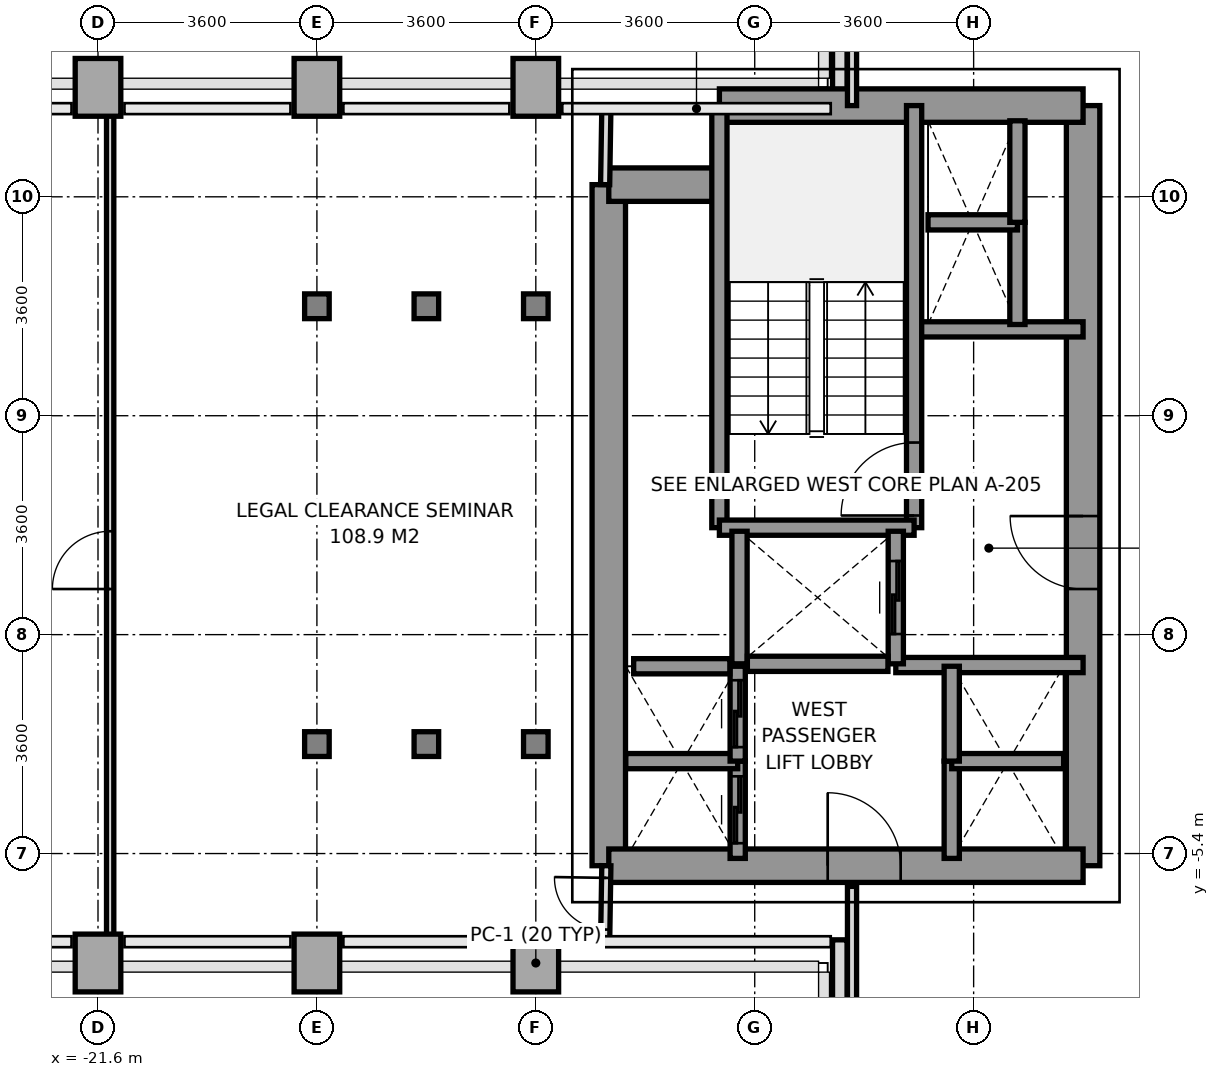
"""IFC4 building model, lengths in metres.
Left out: names, types, materials, properties, quantities, classifications, styles, units other than length and angle.
Written with IfcOpenShell. Run it as: python <this file> out.ifc"""

import sys

from ifc_helpers import new_model, si_unit, direction, frame, frame_2d, origin, origin_2d, place, context, subcontext, project, spatial, rectangle, i_section, extrude, source, transform, mapped, element, fill, save


model = new_model("IFC4")
c1 = context("Model", 3, precision=1e-05, world=origin(), true_north=direction((0.0, 1.0)))
c2 = subcontext(c1, "Body", "Model", "MODEL_VIEW")
j1 = project(units=[si_unit("LENGTHUNIT", "METRE"), si_unit("PLANEANGLEUNIT", "RADIAN")], contexts=[c1])
p1 = place(None, origin())
s1 = spatial("IfcSite", under=j1, at=p1, CompositionType="ELEMENT")
p2 = place(p1, origin())
s2 = spatial("IfcBuilding", under=s1, at=p2, CompositionType="ELEMENT")
p3 = place(p2, frame((0.0, 0.0, 68.0)))
s3 = spatial("IfcBuildingStorey", under=s2, at=p3, CompositionType="ELEMENT", Elevation=68.0)
m1 = source(origin(), c2, "Body", "SweptSolid", [
    extrude(rectangle(XDim=0.75, YDim=0.95, at=origin_2d()), origin(), (0.0, 0.0, 1.0), 3.2),
])
for number, where, z_axis, x_axis in (
    (1, (-21.6, -7.2, 0.0), (0.0, 0.0, 1.0), (1.0, 0.0, 0.0)),
    (2, (-21.6, 7.2, 0.0), (0.0, 0.0, 1.0), (1.0, 0.0, 0.0)),
    (3, (-18.0, -7.2, 0.0), (0.0, 0.0, 1.0), (1.0, 0.0, 0.0)),
):
    element("IfcColumn", number, at=place(p3, frame(where, z_axis=z_axis, x_axis=x_axis)), inside=s3, PredefinedType="COLUMN", context=c2, shape_type="MappedRepresentation", body=[
        mapped(m1, transform((0.0, 0.0, 0.0), x_axis=(1.0, 0.0, 0.0), y_axis=(0.0, 1.0, 0.0), z_axis=(0.0, 0.0, 1.0), scale=1.0)),
    ])
m2 = source(origin(), c2, "Body", "SweptSolid", [
    extrude(i_section(OverallWidth=0.404, OverallDepth=0.407, WebThickness=0.022, FlangeThickness=0.035, at=origin_2d()), origin(), (0.0, 0.0, 1.0), 3.2),
])
for number, where, z_axis, x_axis in (
    (4, (-18.0, -3.6, 0.0), (0.0, 0.0, 1.0), (1.0, 0.0, 0.0)),
    (5, (-18.0, 3.6, 0.0), (0.0, 0.0, 1.0), (1.0, 0.0, 0.0)),
):
    element("IfcColumn", number, at=place(p3, frame(where, z_axis=z_axis, x_axis=x_axis)), inside=s3, PredefinedType="COLUMN", context=c2, shape_type="MappedRepresentation", body=[
        mapped(m2, transform((0.0, 0.0, 0.0), x_axis=(1.0, 0.0, 0.0), y_axis=(0.0, 1.0, 0.0), z_axis=(0.0, 0.0, 1.0), scale=1.0)),
    ])
p4 = place(p3, frame((-18.0, 7.2, 0.0), z_axis=(0.0, 0.0, 1.0), x_axis=(1.0, 0.0, 0.0)))
e6 = element("IfcColumn", 6, at=p4, inside=s3, PredefinedType="COLUMN", context=c2, shape_type="MappedRepresentation", body=[
    mapped(m1, transform((0.0, 0.0, 0.0), x_axis=(1.0, 0.0, 0.0), y_axis=(0.0, 1.0, 0.0), z_axis=(0.0, 0.0, 1.0), scale=1.0)),
])
for number, where, z_axis, x_axis in (
    (7, (-16.2, -3.6, 0.0), (0.0, 0.0, 1.0), (1.0, 0.0, 0.0)),
    (8, (-16.2, 3.6, 0.0), (0.0, 0.0, 1.0), (1.0, 0.0, 0.0)),
):
    element("IfcColumn", number, at=place(p3, frame(where, z_axis=z_axis, x_axis=x_axis)), inside=s3, PredefinedType="COLUMN", context=c2, shape_type="MappedRepresentation", body=[
        mapped(m2, transform((0.0, 0.0, 0.0), x_axis=(1.0, 0.0, 0.0), y_axis=(0.0, 1.0, 0.0), z_axis=(0.0, 0.0, 1.0), scale=1.0)),
    ])
p5 = place(p3, frame((-14.4, -7.2, 0.0), z_axis=(0.0, 0.0, 1.0), x_axis=(1.0, 0.0, 0.0)))
e9 = element("IfcColumn", 9, at=p5, inside=s3, PredefinedType="COLUMN", context=c2, shape_type="MappedRepresentation", body=[
    mapped(m1, transform((0.0, 0.0, 0.0), x_axis=(1.0, 0.0, 0.0), y_axis=(0.0, 1.0, 0.0), z_axis=(0.0, 0.0, 1.0), scale=1.0)),
])
for number, where, z_axis, x_axis in (
    (10, (-14.4, -3.6, 0.0), (0.0, 0.0, 1.0), (1.0, 0.0, 0.0)),
    (11, (-14.4, 3.6, 0.0), (0.0, 0.0, 1.0), (1.0, 0.0, 0.0)),
):
    element("IfcColumn", number, at=place(p3, frame(where, z_axis=z_axis, x_axis=x_axis)), inside=s3, PredefinedType="COLUMN", context=c2, shape_type="MappedRepresentation", body=[
        mapped(m2, transform((0.0, 0.0, 0.0), x_axis=(1.0, 0.0, 0.0), y_axis=(0.0, 1.0, 0.0), z_axis=(0.0, 0.0, 1.0), scale=1.0)),
    ])
p6 = place(p3, frame((-14.4, 7.2, 0.0), z_axis=(0.0, 0.0, 1.0), x_axis=(1.0, 0.0, 0.0)))
e12 = element("IfcColumn", 12, at=p6, inside=s3, PredefinedType="COLUMN", context=c2, shape_type="MappedRepresentation", body=[
    mapped(m1, transform((0.0, 0.0, 0.0), x_axis=(1.0, 0.0, 0.0), y_axis=(0.0, 1.0, 0.0), z_axis=(0.0, 0.0, 1.0), scale=1.0)),
])
p7 = place(p3, frame((-9.4, -8.397, 0.0), z_axis=(0.0, 0.0, 1.0), x_axis=(0.0, 1.0, 0.0)))
e13 = element("IfcWall", 13, at=p7, inside=s3, PredefinedType="PARAPET", context=c2, shape_type="SweptSolid", body=[
    extrude(rectangle(XDim=1.578, YDim=0.24, at=frame_2d((0.789, 0.0))), origin(), (0.0, 0.0, 1.0), 1.15),
])
p8 = place(p3, frame((-9.4, 6.953, 0.0), z_axis=(0.0, 0.0, 1.0), x_axis=(0.0, 1.0, 0.0)))
e14 = element("IfcWall", 14, at=p8, inside=s3, PredefinedType="PARAPET", context=c2, shape_type="SweptSolid", body=[
    extrude(rectangle(XDim=1.444, YDim=0.24, at=frame_2d((0.722, 0.0))), origin(), (0.0, 0.0, 1.0), 1.15),
])
p9 = place(p3, frame((-13.2, -5.6, 0.0), z_axis=(0.0, 0.0, 1.0), x_axis=(0.0, 1.0, 0.0)))
e15 = element("IfcWall", 15, at=p9, inside=s3, PredefinedType="SHEAR", context=c2, shape_type="SweptSolid", body=[
    extrude(rectangle(XDim=11.2, YDim=0.55, at=frame_2d((5.6, 0.0))), origin(), (0.0, 0.0, 1.0), 3.2),
])
p10 = place(p3, frame((-5.4, -5.6, 0.0), z_axis=(0.0, 0.0, 1.0), x_axis=(0.0, 1.0, 0.0)))
e16 = element("IfcWall", 16, at=p10, inside=s3, PredefinedType="SHEAR", context=c2, shape_type="SweptSolid", body=[
    extrude(rectangle(XDim=12.5, YDim=0.55, at=frame_2d((6.25, 0.0))), origin(), (0.0, 0.0, 1.0), 3.2),
])
p11 = place(p10, frame((4.55, 0.0, 0.0)))
e17 = element("IfcOpeningElement", 17, at=p11, cuts=e16, PredefinedType="OPENING", context=c2, shape_type="SweptSolid", body=[
    extrude(rectangle(XDim=1.2, YDim=2.2, at=frame_2d((0.6, 1.1))), frame((0.0, 0.285, 0.0), z_axis=(0.0, -1.0, 0.0), x_axis=(1.0, 0.0, 0.0)), (0.0, 0.0, 1.0), 0.57),
])
p12 = place(p3, frame((-11.381, 6.9, 0.0), z_axis=(0.0, 0.0, 1.0), x_axis=(1.0, 0.0, 0.0)))
e18 = element("IfcWall", 18, at=p12, inside=s3, PredefinedType="SHEAR", context=c2, shape_type="SweptSolid", body=[
    extrude(rectangle(XDim=5.981, YDim=0.55, at=frame_2d((2.991, 0.0))), origin(), (0.0, 0.0, 1.0), 3.2),
])
p13 = place(p3, frame((-13.2, 5.6, 0.0), z_axis=(0.0, 0.0, 1.0), x_axis=(1.0, 0.0, 0.0)))
e19 = element("IfcWall", 19, at=p13, inside=s3, PredefinedType="SHEAR", context=c2, shape_type="SweptSolid", body=[
    extrude(rectangle(XDim=1.819, YDim=0.55, at=frame_2d((0.909, 0.0))), origin(), (0.0, 0.0, 1.0), 3.2),
])
p14 = place(p3, frame((-13.2, -5.6, 0.0), z_axis=(0.0, 0.0, 1.0), x_axis=(1.0, 0.0, 0.0)))
e20 = element("IfcWall", 20, at=p14, inside=s3, PredefinedType="SHEAR", context=c2, shape_type="SweptSolid", body=[
    extrude(rectangle(XDim=7.8, YDim=0.55, at=frame_2d((3.9, 0.0))), origin(), (0.0, 0.0, 1.0), 3.2),
])
p15 = place(p14, frame((3.6, 0.0, 0.0)))
e21 = element("IfcOpeningElement", 21, at=p15, cuts=e20, PredefinedType="OPENING", context=c2, shape_type="SweptSolid", body=[
    extrude(rectangle(XDim=1.2, YDim=2.2, at=frame_2d((0.6, 1.1))), frame((0.0, 0.285, 0.0), z_axis=(0.0, -1.0, 0.0), x_axis=(1.0, 0.0, 0.0)), (0.0, 0.0, 1.0), 0.57),
])
p16 = place(p3, frame((-8.18, 3.22, 0.0), z_axis=(0.0, 0.0, 1.0), x_axis=(1.0, 0.0, 0.0)))
e22 = element("IfcWall", 22, at=p16, inside=s3, PredefinedType="SOLIDWALL", context=c2, shape_type="SweptSolid", body=[
    extrude(rectangle(XDim=2.78, YDim=0.25, at=frame_2d((1.39, 0.0))), origin(), (0.0, 0.0, 1.0), 3.2),
])
p17 = place(p3, frame((-8.48, -2.3, 0.0), z_axis=(0.0, 0.0, 1.0), x_axis=(1.0, 0.0, 0.0)))
e23 = element("IfcWall", 23, at=p17, inside=s3, PredefinedType="SOLIDWALL", context=c2, shape_type="SweptSolid", body=[
    extrude(rectangle(XDim=3.08, YDim=0.25, at=frame_2d((1.54, 0.0))), origin(), (0.0, 0.0, 1.0), 3.2),
])
p18 = place(p3, frame((-8.179, -0.041, 0.0), z_axis=(0.0, 0.0, 1.0), x_axis=(0.0, 1.0, 0.0)))
e24 = element("IfcWall", 24, at=p18, inside=s3, PredefinedType="SOLIDWALL", context=c2, shape_type="SweptSolid", body=[
    extrude(rectangle(XDim=6.941, YDim=0.25, at=frame_2d((3.47, 0.0))), origin(), (0.0, 0.0, 1.0), 3.2),
])
p19 = place(p18, frame((0.2, 0.0, 0.0)))
e25 = element("IfcOpeningElement", 25, at=p19, cuts=e24, PredefinedType="OPENING", context=c2, shape_type="SweptSolid", body=[
    extrude(rectangle(XDim=1.2, YDim=2.2, at=frame_2d((0.6, 1.1))), frame((0.0, 0.135, 0.0), z_axis=(0.0, -1.0, 0.0), x_axis=(1.0, 0.0, 0.0)), (0.0, 0.0, 1.0), 0.27),
])
p20 = place(p3, frame((-11.381, -0.041, 0.0), z_axis=(0.0, 0.0, 1.0), x_axis=(0.0, 1.0, 0.0)))
e26 = element("IfcWall", 26, at=p20, inside=s3, PredefinedType="SOLIDWALL", context=c2, shape_type="SweptSolid", body=[
    extrude(rectangle(XDim=6.941, YDim=0.25, at=frame_2d((3.47, 0.0))), origin(), (0.0, 0.0, 1.0), 3.2),
])
p21 = place(p3, frame((-11.381, -0.041, 0.0), z_axis=(0.0, 0.0, 1.0), x_axis=(1.0, 0.0, 0.0)))
e27 = element("IfcWall", 27, at=p21, inside=s3, PredefinedType="SOLIDWALL", context=c2, shape_type="SweptSolid", body=[
    extrude(rectangle(XDim=3.202, YDim=0.25, at=frame_2d((1.601, 0.0))), origin(), (0.0, 0.0, 1.0), 3.2),
])
p22 = place(p3, frame((-11.05, -2.28, 0.0), z_axis=(0.0, 0.0, 1.0), x_axis=(0.0, 1.0, 0.0)))
e28 = element("IfcWall", 28, at=p22, inside=s3, PredefinedType="SOLIDWALL", context=c2, shape_type="SweptSolid", body=[
    extrude(rectangle(XDim=2.18, YDim=0.25, at=frame_2d((1.09, 0.0))), origin(), (0.0, 0.0, 1.0), 3.2),
])
p23 = place(p3, frame((-8.48, -2.28, 0.0), z_axis=(0.0, 0.0, 1.0), x_axis=(0.0, 1.0, 0.0)))
e29 = element("IfcWall", 29, at=p23, inside=s3, PredefinedType="SOLIDWALL", context=c2, shape_type="SweptSolid", body=[
    extrude(rectangle(XDim=2.18, YDim=0.25, at=frame_2d((1.09, 0.0))), origin(), (0.0, 0.0, 1.0), 3.2),
])
p24 = place(p23, frame((0.49, 0.0, 0.0)))
e30 = element("IfcOpeningElement", 30, at=p24, cuts=e29, PredefinedType="OPENING", context=c2, shape_type="SweptSolid", body=[
    extrude(rectangle(XDim=1.2, YDim=2.2, at=frame_2d((0.6, 1.1))), frame((0.0, 0.135, 0.0), z_axis=(0.0, -1.0, 0.0), x_axis=(1.0, 0.0, 0.0)), (0.0, 0.0, 1.0), 0.27),
])
p25 = place(p3, frame((-10.921, -2.28, 0.0), z_axis=(0.0, 0.0, 1.0), x_axis=(1.0, 0.0, 0.0)))
e31 = element("IfcWall", 31, at=p25, inside=s3, PredefinedType="SOLIDWALL", context=c2, shape_type="SweptSolid", body=[
    extrude(rectangle(XDim=2.312, YDim=0.25, at=frame_2d((1.156, 0.0))), origin(), (0.0, 0.0, 1.0), 3.2),
])
p26 = place(p3, frame((-11.08, -5.48, 0.0), z_axis=(0.0, 0.0, 1.0), x_axis=(0.0, 1.0, 0.0)))
e32 = element("IfcWall", 32, at=p26, inside=s3, PredefinedType="SOLIDWALL", context=c2, shape_type="SweptSolid", body=[
    extrude(rectangle(XDim=1.6, YDim=0.25, at=frame_2d((0.8, 0.0))), origin(), (0.0, 0.0, 1.0), 3.2),
])
p27 = place(p26, frame((0.25, 0.0, 0.0)))
e33 = element("IfcOpeningElement", 33, at=p27, cuts=e32, PredefinedType="OPENING", context=c2, shape_type="SweptSolid", body=[
    extrude(rectangle(XDim=1.1, YDim=2.2, at=frame_2d((0.55, 1.1))), frame((0.0, 0.135, 0.0), z_axis=(0.0, -1.0, 0.0), x_axis=(1.0, 0.0, 0.0)), (0.0, 0.0, 1.0), 0.27),
])
p28 = place(p3, frame((-12.92, -3.88, 0.0), z_axis=(0.0, 0.0, 1.0), x_axis=(1.0, 0.0, 0.0)))
e34 = element("IfcWall", 34, at=p28, inside=s3, PredefinedType="SOLIDWALL", context=c2, shape_type="SweptSolid", body=[
    extrude(rectangle(XDim=1.84, YDim=0.25, at=frame_2d((0.92, 0.0))), origin(), (0.0, 0.0, 1.0), 3.2),
])
p29 = place(p3, frame((-11.08, -3.88, 0.0), z_axis=(0.0, 0.0, 1.0), x_axis=(0.0, 1.0, 0.0)))
e35 = element("IfcWall", 35, at=p29, inside=s3, PredefinedType="SOLIDWALL", context=c2, shape_type="SweptSolid", body=[
    extrude(rectangle(XDim=1.56, YDim=0.25, at=frame_2d((0.78, 0.0))), origin(), (0.0, 0.0, 1.0), 3.2),
])
p30 = place(p29, frame((0.23, 0.0, 0.0)))
e36 = element("IfcOpeningElement", 36, at=p30, cuts=e35, PredefinedType="OPENING", context=c2, shape_type="SweptSolid", body=[
    extrude(rectangle(XDim=1.1, YDim=2.2, at=frame_2d((0.55, 1.1))), frame((0.0, 0.135, 0.0), z_axis=(0.0, -1.0, 0.0), x_axis=(1.0, 0.0, 0.0)), (0.0, 0.0, 1.0), 0.27),
])
p31 = place(p3, frame((-12.791, -2.32, 0.0), z_axis=(0.0, 0.0, 1.0), x_axis=(1.0, 0.0, 0.0)))
e37 = element("IfcWall", 37, at=p31, inside=s3, PredefinedType="SOLIDWALL", context=c2, shape_type="SweptSolid", body=[
    extrude(rectangle(XDim=1.582, YDim=0.25, at=frame_2d((0.791, 0.0))), origin(), (0.0, 0.0, 1.0), 3.2),
])
p32 = place(p3, frame((-7.56, -5.48, 0.0), z_axis=(0.0, 0.0, 1.0), x_axis=(0.0, 1.0, 0.0)))
e38 = element("IfcWall", 38, at=p32, inside=s3, PredefinedType="SOLIDWALL", context=c2, shape_type="SweptSolid", body=[
    extrude(rectangle(XDim=1.6, YDim=0.25, at=frame_2d((0.8, 0.0))), origin(), (0.0, 0.0, 1.0), 3.2),
])
p33 = place(p3, frame((-7.56, -3.88, 0.0), z_axis=(0.0, 0.0, 1.0), x_axis=(1.0, 0.0, 0.0)))
e39 = element("IfcWall", 39, at=p33, inside=s3, PredefinedType="SOLIDWALL", context=c2, shape_type="SweptSolid", body=[
    extrude(rectangle(XDim=1.84, YDim=0.25, at=frame_2d((0.92, 0.0))), origin(), (0.0, 0.0, 1.0), 3.2),
])
p34 = place(p3, frame((-7.56, -3.88, 0.0), z_axis=(0.0, 0.0, 1.0), x_axis=(0.0, 1.0, 0.0)))
e40 = element("IfcWall", 40, at=p34, inside=s3, PredefinedType="SOLIDWALL", context=c2, shape_type="SweptSolid", body=[
    extrude(rectangle(XDim=1.56, YDim=0.25, at=frame_2d((0.78, 0.0))), origin(), (0.0, 0.0, 1.0), 3.2),
])
p35 = place(p3, frame((-6.48, 3.3, 0.0), z_axis=(0.0, 0.0, 1.0), x_axis=(0.0, 1.0, 0.0)))
e41 = element("IfcWall", 41, at=p35, inside=s3, PredefinedType="SOLIDWALL", context=c2, shape_type="SweptSolid", body=[
    extrude(rectangle(XDim=1.68, YDim=0.25, at=frame_2d((0.84, 0.0))), origin(), (0.0, 0.0, 1.0), 3.2),
])
p36 = place(p3, frame((-7.95, 4.98, 0.0), z_axis=(0.0, 0.0, 1.0), x_axis=(1.0, 0.0, 0.0)))
e42 = element("IfcWall", 42, at=p36, inside=s3, PredefinedType="SOLIDWALL", context=c2, shape_type="SweptSolid", body=[
    extrude(rectangle(XDim=1.47, YDim=0.25, at=frame_2d((0.735, 0.0))), origin(), (0.0, 0.0, 1.0), 3.2),
])
p37 = place(p3, frame((-6.48, 4.98, 0.0), z_axis=(0.0, 0.0, 1.0), x_axis=(0.0, 1.0, 0.0)))
e43 = element("IfcWall", 43, at=p37, inside=s3, PredefinedType="SOLIDWALL", context=c2, shape_type="SweptSolid", body=[
    extrude(rectangle(XDim=1.67, YDim=0.25, at=frame_2d((0.835, 0.0))), origin(), (0.0, 0.0, 1.0), 3.2),
])
p38 = place(p3, frame((-9.2, 6.9, 0.0), z_axis=(0.0, 0.0, 1.0), x_axis=(0.0, 1.0, 0.0)))
e44 = element("IfcWall", 44, at=p38, inside=s3, PredefinedType="PARTITIONING", context=c2, shape_type="SweptSolid", body=[
    extrude(rectangle(XDim=8.78, YDim=0.15, at=frame_2d((4.39, 0.0))), origin(), (0.0, 0.0, 1.0), 2.71),
])
p39 = place(p3, frame((-9.2, -15.68, 0.0), z_axis=(0.0, 0.0, 1.0), x_axis=(0.0, 1.0, 0.0)))
e45 = element("IfcWall", 45, at=p39, inside=s3, PredefinedType="PARTITIONING", context=c2, shape_type="SweptSolid", body=[
    extrude(rectangle(XDim=9.74, YDim=0.15, at=frame_2d((4.87, 0.0))), origin(), (0.0, 0.0, 1.0), 2.71),
])
p40 = place(p3, frame((-13.26, 5.6, 0.0), z_axis=(0.0, 0.0, 1.0), x_axis=(0.016013571389, 0.999871774545, 0.0)))
e46 = element("IfcWall", 46, at=p40, inside=s3, PredefinedType="PARTITIONING", context=c2, shape_type="SweptSolid", body=[
    extrude(rectangle(XDim=1.25, YDim=0.15, at=frame_2d((0.625, 0.0))), origin(), (0.0, 0.0, 1.0), 3.2),
])
p41 = place(p3, frame((-13.26, -6.85, 0.0), z_axis=(0.0, 0.0, 1.0), x_axis=(0.016013571389, 0.999871774545, 0.0)))
e47 = element("IfcWall", 47, at=p41, inside=s3, PredefinedType="PARTITIONING", context=c2, shape_type="SweptSolid", body=[
    extrude(rectangle(XDim=1.25, YDim=0.15, at=frame_2d((0.625, 0.0))), origin(), (0.0, 0.0, 1.0), 3.2),
])
p42 = place(p41, frame((0.2, 0.0, 0.0)))
e48 = element("IfcOpeningElement", 48, at=p42, cuts=e47, PredefinedType="OPENING", context=c2, shape_type="SweptSolid", body=[
    extrude(rectangle(XDim=0.85, YDim=2.1, at=frame_2d((0.425, 1.05))), frame((0.0, 0.085, 0.0), z_axis=(0.0, -1.0, 0.0), x_axis=(1.0, 0.0, 0.0)), (0.0, 0.0, 1.0), 0.17),
])
p43 = place(p3, frame((-21.4, -6.85, 0.0), z_axis=(0.0, 0.0, 1.0), x_axis=(0.0, 1.0, 0.0)))
e49 = element("IfcWall", 49, at=p43, inside=s3, PredefinedType="PARTITIONING", context=c2, shape_type="SweptSolid", body=[
    extrude(rectangle(XDim=13.7, YDim=0.12, at=frame_2d((6.85, 0.0))), origin(), (0.0, 0.0, 1.0), 2.71),
])
p44 = place(p43, frame((5.8, 0.0, 0.0)))
e50 = element("IfcOpeningElement", 50, at=p44, cuts=e49, PredefinedType="OPENING", context=c2, shape_type="SweptSolid", body=[
    extrude(rectangle(XDim=0.95, YDim=2.15, at=frame_2d((0.475, 1.075))), frame((0.0, 0.07, 0.0), z_axis=(0.0, -1.0, 0.0), x_axis=(1.0, 0.0, 0.0)), (0.0, 0.0, 1.0), 0.14),
])
m3 = source(origin(), c2, "Body", "SweptSolid", [
    extrude(rectangle(XDim=1.2, YDim=2.2, at=frame_2d((0.6, 1.1))), frame((0.0, 0.025, 0.0), z_axis=(0.0, -1.0, 0.0), x_axis=(1.0, 0.0, 0.0)), (0.0, 0.0, 1.0), 0.05),
])
p45 = place(p19, origin())
e51 = element("IfcDoor", 51, at=p45, inside=s3, OperationType="SINGLE_SWING_LEFT", PredefinedType="DOOR", context=c2, shape_type="MappedRepresentation", body=[
    mapped(m3, transform((0.0, 0.0, 0.0), x_axis=(1.0, 0.0, 0.0), y_axis=(0.0, 1.0, 0.0), z_axis=(0.0, 0.0, 1.0), scale=1.0)),
])
fill(e25, e51)
p46 = place(p11, origin())
e52 = element("IfcDoor", 52, at=p46, inside=s3, OperationType="SINGLE_SWING_RIGHT", PredefinedType="DOOR", context=c2, shape_type="MappedRepresentation", body=[
    mapped(m3, transform((0.0, 0.0, 0.0), x_axis=(1.0, 0.0, 0.0), y_axis=(0.0, 1.0, 0.0), z_axis=(0.0, 0.0, 1.0), scale=1.0)),
])
fill(e17, e52)
p47 = place(p15, origin())
e53 = element("IfcDoor", 53, at=p47, inside=s3, OperationType="SINGLE_SWING_LEFT", PredefinedType="DOOR", context=c2, shape_type="MappedRepresentation", body=[
    mapped(m3, transform((0.0, 0.0, 0.0), x_axis=(1.0, 0.0, 0.0), y_axis=(0.0, 1.0, 0.0), z_axis=(0.0, 0.0, 1.0), scale=1.0)),
])
fill(e21, e53)
p48 = place(p24, origin())
e54 = element("IfcDoor", 54, at=p48, inside=s3, OperationType="SLIDING_TO_RIGHT", PredefinedType="DOOR", context=c2, shape_type="MappedRepresentation", body=[
    mapped(m3, transform((0.0, 0.0, 0.0), x_axis=(1.0, 0.0, 0.0), y_axis=(0.0, 1.0, 0.0), z_axis=(0.0, 0.0, 1.0), scale=1.0)),
])
fill(e30, e54)
m4 = source(origin(), c2, "Body", "SweptSolid", [
    extrude(rectangle(XDim=1.1, YDim=2.2, at=frame_2d((0.55, 1.1))), frame((0.0, 0.025, 0.0), z_axis=(0.0, -1.0, 0.0), x_axis=(1.0, 0.0, 0.0)), (0.0, 0.0, 1.0), 0.05),
])
p49 = place(p27, origin())
e55 = element("IfcDoor", 55, at=p49, inside=s3, OperationType="SLIDING_TO_LEFT", PredefinedType="DOOR", context=c2, shape_type="MappedRepresentation", body=[
    mapped(m4, transform((0.0, 0.0, 0.0), x_axis=(1.0, 0.0, 0.0), y_axis=(0.0, 1.0, 0.0), z_axis=(0.0, 0.0, 1.0), scale=1.0)),
])
fill(e33, e55)
p50 = place(p30, origin())
e56 = element("IfcDoor", 56, at=p50, inside=s3, OperationType="SLIDING_TO_LEFT", PredefinedType="DOOR", context=c2, shape_type="MappedRepresentation", body=[
    mapped(m4, transform((0.0, 0.0, 0.0), x_axis=(1.0, 0.0, 0.0), y_axis=(0.0, 1.0, 0.0), z_axis=(0.0, 0.0, 1.0), scale=1.0)),
])
fill(e36, e56)
m5 = source(origin(), c2, "Body", "SweptSolid", [
    extrude(rectangle(XDim=0.85, YDim=2.1, at=frame_2d((0.425, 1.05))), frame((0.0, 0.025, 0.0), z_axis=(0.0, -1.0, 0.0), x_axis=(1.0, 0.0, 0.0)), (0.0, 0.0, 1.0), 0.05),
])
p51 = place(p42, origin())
e57 = element("IfcDoor", 57, at=p51, inside=s3, OperationType="SINGLE_SWING_RIGHT", PredefinedType="DOOR", context=c2, shape_type="MappedRepresentation", body=[
    mapped(m5, transform((0.0, 0.0, 0.0), x_axis=(1.0, 0.0, 0.0), y_axis=(0.0, 1.0, 0.0), z_axis=(0.0, 0.0, 1.0), scale=1.0)),
])
fill(e48, e57)
m6 = source(origin(), c2, "Body", "SweptSolid", [
    extrude(rectangle(XDim=0.95, YDim=2.15, at=frame_2d((0.475, 1.075))), frame((0.0, 0.025, 0.0), z_axis=(0.0, -1.0, 0.0), x_axis=(1.0, 0.0, 0.0)), (0.0, 0.0, 1.0), 0.05),
])
p52 = place(p44, origin())
e58 = element("IfcDoor", 58, at=p52, inside=s3, OperationType="SINGLE_SWING_LEFT", PredefinedType="DOOR", context=c2, shape_type="MappedRepresentation", body=[
    mapped(m6, transform((0.0, 0.0, 0.0), x_axis=(1.0, 0.0, 0.0), y_axis=(0.0, 1.0, 0.0), z_axis=(0.0, 0.0, 1.0), scale=1.0)),
])
fill(e50, e58)
save(model, sys.argv[1])
